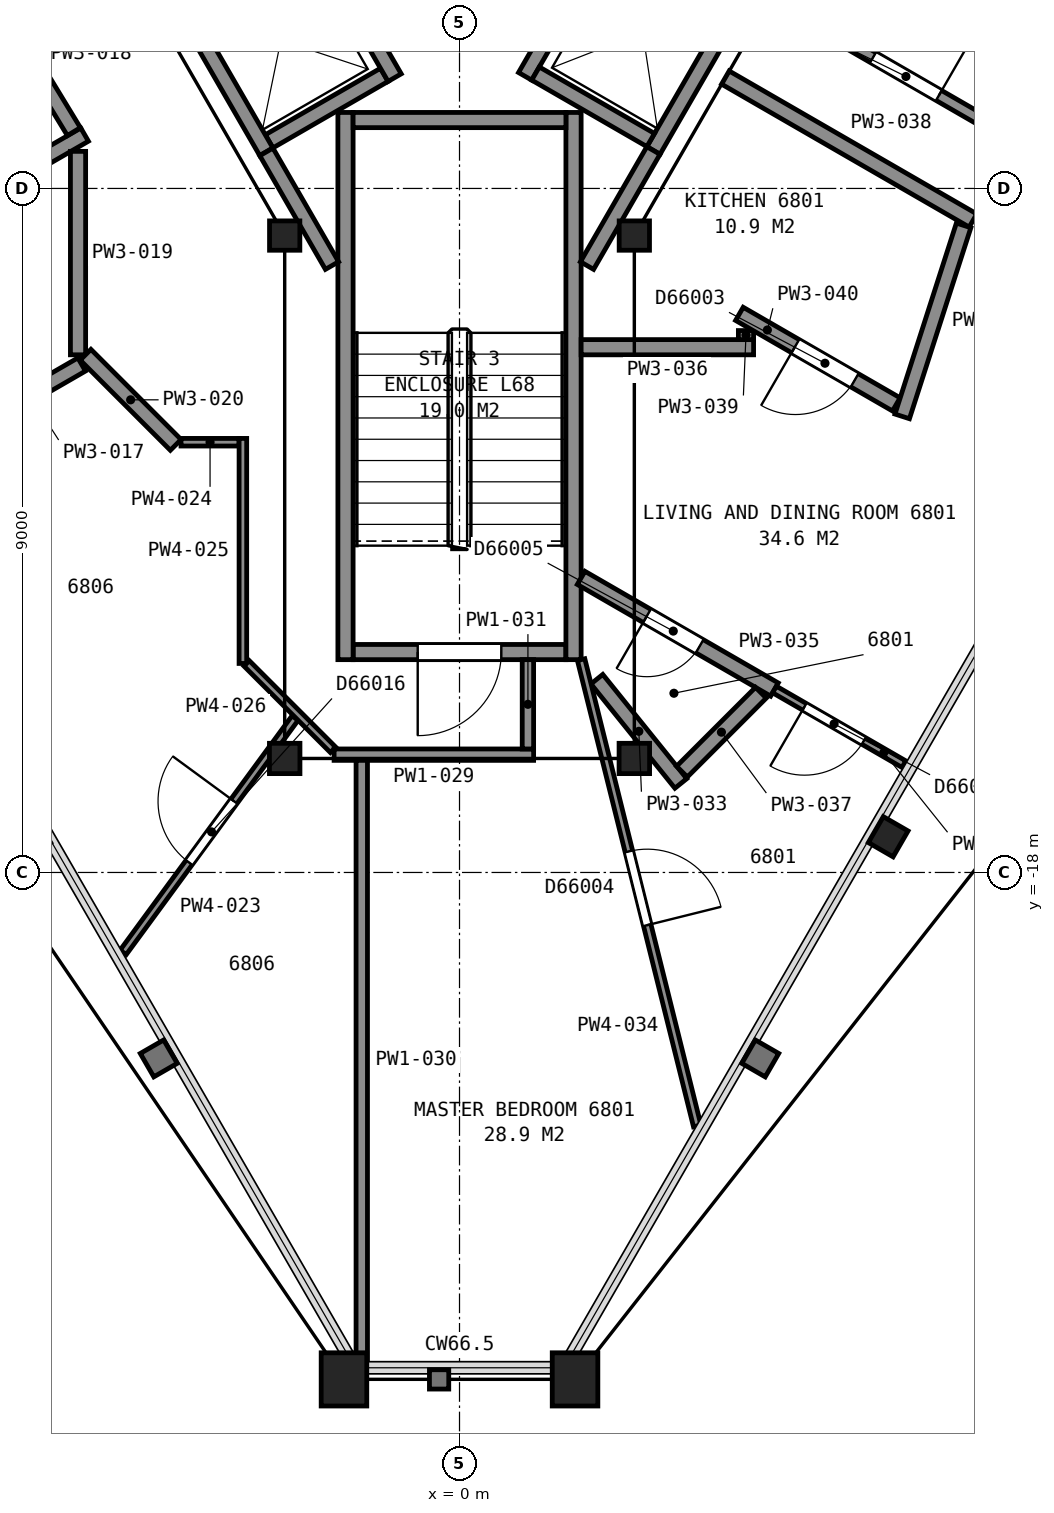
"""IFC4 building model, lengths in metres.
Left out: names, types, materials, properties, quantities, classifications, styles, units other than length and angle.
Written with IfcOpenShell. Run it as: python <this file> out.ifc"""

import sys

from ifc_helpers import new_model, si_unit, direction, frame, frame_2d, origin, origin_2d, place, context, subcontext, project, spatial, rectangle, hollow_rectangle, i_section, extrude, element, fill, save


model = new_model("IFC4")
c1 = context("Model", 3, precision=1e-05, world=origin(), true_north=direction((0.0, 1.0)))
c2 = subcontext(c1, "Body", "Model", "MODEL_VIEW")
j1 = project(units=[si_unit("LENGTHUNIT", "METRE"), si_unit("PLANEANGLEUNIT", "RADIAN")], contexts=[c1])
p1 = place(None, origin())
s1 = spatial("IfcSite", under=j1, at=p1, CompositionType="ELEMENT")
p2 = place(p1, origin())
s2 = spatial("IfcBuilding", under=s1, at=p2, CompositionType="ELEMENT")
p3 = place(p2, frame((0.0, 0.0, 271.4)))
s3 = spatial("IfcBuildingStorey", under=s2, at=p3, CompositionType="ELEMENT", Elevation=271.4)
for number, where, z_axis, x_axis in (
    (1, (-1.52, -24.67, 0.0), (0.0, 0.0, 1.0), (-1.0, 0.0, 0.0)),
    (2, (1.52, -24.67, 0.0), (0.0, 0.0, 1.0), (-1.0, 0.0, 0.0)),
):
    element("IfcColumn", number, at=place(p3, frame(where, z_axis=z_axis, x_axis=x_axis)), inside=s3, PredefinedType="COLUMN", context=c2, shape_type="SweptSolid", body=[
        extrude(hollow_rectangle(XDim=0.6, YDim=0.7, WallThickness=0.04, at=origin_2d()), origin(), (0.0, 0.0, 1.0), 3.7),
    ])
p4 = place(p3, frame((5.64, -17.53, 0.0), z_axis=(0.0, 0.0, 1.0), x_axis=(-0.5, -0.866025403784, 0.0)))
e3 = element("IfcColumn", 3, at=p4, inside=s3, PredefinedType="COLUMN", context=c2, shape_type="SweptSolid", body=[
    extrude(i_section(OverallWidth=0.394, OverallDepth=0.376, WebThickness=0.017, FlangeThickness=0.028, FilletRadius=0.015, at=origin_2d()), origin(), (0.0, 0.0, 1.0), 3.7),
])
p5 = place(p3, frame((-2.3, -9.62, 0.0), z_axis=(0.0, 0.0, 1.0), x_axis=(1.0, 0.0, 0.0)))
e4 = element("IfcColumn", 4, at=p5, inside=s3, PredefinedType="COLUMN", context=c2, shape_type="SweptSolid", body=[
    extrude(i_section(OverallWidth=0.399, OverallDepth=0.386, WebThickness=0.021, FlangeThickness=0.033, FilletRadius=0.015, at=origin_2d()), origin(), (0.0, 0.0, 1.0), 3.7),
])
for number, where, z_axis, x_axis in (
    (5, (-2.3, -16.5, 0.0), (0.0, 0.0, 1.0), (-1.0, 0.0, 0.0)),
    (6, (2.3, -16.5, 0.0), (0.0, 0.0, 1.0), (-1.0, 0.0, 0.0)),
):
    element("IfcColumn", number, at=place(p3, frame(where, z_axis=z_axis, x_axis=x_axis)), inside=s3, PredefinedType="COLUMN", context=c2, shape_type="SweptSolid", body=[
        extrude(i_section(OverallWidth=0.401, OverallDepth=0.399, WebThickness=0.025, FlangeThickness=0.04, FilletRadius=0.015, at=origin_2d()), origin(), (0.0, 0.0, 1.0), 3.7),
    ])
p6 = place(p3, frame((2.3, -9.62, 0.0), z_axis=(0.0, 0.0, 1.0), x_axis=(1.0, 0.0, 0.0)))
e7 = element("IfcColumn", 7, at=p6, inside=s3, PredefinedType="COLUMN", context=c2, shape_type="SweptSolid", body=[
    extrude(i_section(OverallWidth=0.399, OverallDepth=0.386, WebThickness=0.021, FlangeThickness=0.033, FilletRadius=0.015, at=origin_2d()), origin(), (0.0, 0.0, 1.0), 3.7),
])
p7 = place(p3, frame((-1.4, -15.1, 0.0), z_axis=(0.0, 0.0, 1.0), x_axis=(1.0, 0.0, 0.0)))
e8 = element("IfcWall", 8, at=p7, inside=s3, PredefinedType="PARTITIONING", context=c2, shape_type="SweptSolid", body=[
    extrude(rectangle(XDim=2.8, YDim=0.2, at=frame_2d((1.4, 0.0))), origin(), (0.0, 0.0, 1.0), 3.45),
])
p8 = place(p7, frame((0.85, 0.0, 0.0)))
e9 = element("IfcOpeningElement", 9, at=p8, cuts=e8, PredefinedType="OPENING", context=c2, shape_type="SweptSolid", body=[
    extrude(rectangle(XDim=1.1, YDim=2.1, at=frame_2d((0.55, 1.05))), frame((0.0, 0.11, 0.0), z_axis=(0.0, -1.0, 0.0), x_axis=(1.0, 0.0, 0.0)), (0.0, 0.0, 1.0), 0.22),
])
for number, where, z_axis, x_axis in (
    (10, (1.5, -8.0, 0.0), (0.0, 0.0, 1.0), (0.0, -1.0, 0.0)),
    (11, (-1.5, -8.0, 0.0), (0.0, 0.0, 1.0), (0.0, -1.0, 0.0)),
):
    element("IfcWall", number, at=place(p3, frame(where, z_axis=z_axis, x_axis=x_axis)), inside=s3, PredefinedType="PARTITIONING", context=c2, shape_type="SweptSolid", body=[
        extrude(rectangle(XDim=7.2, YDim=0.2, at=frame_2d((3.6, 0.0))), origin(), (0.0, 0.0, 1.0), 3.45),
    ])
p9 = place(p3, frame((-1.4, -8.1, 0.0), z_axis=(0.0, 0.0, 1.0), x_axis=(1.0, 0.0, 0.0)))
e12 = element("IfcWall", 12, at=p9, inside=s3, PredefinedType="PARTITIONING", context=c2, shape_type="SweptSolid", body=[
    extrude(rectangle(XDim=2.8, YDim=0.2, at=frame_2d((1.4, 0.0))), origin(), (0.0, 0.0, 1.0), 3.45),
])
p10 = place(p3, frame((-2.505, -8.38, 0.0), z_axis=(0.0, 0.0, 1.0), x_axis=(0.866002029911, 0.500040482552, 0.0)))
e13 = element("IfcWall", 13, at=p10, inside=s3, PredefinedType="PARTITIONING", context=c2, shape_type="SweptSolid", body=[
    extrude(rectangle(XDim=1.75, YDim=0.2, at=frame_2d((0.875, 0.0))), origin(), (0.0, 0.0, 1.0), 3.7),
])
p11 = place(p3, frame((2.552, -8.5, 0.0), z_axis=(0.0, 0.0, 1.0), x_axis=(0.499990435942, 0.866030925526, 0.0)))
e14 = element("IfcWall", 14, at=p11, inside=s3, PredefinedType="PARTITIONING", context=c2, shape_type="SweptSolid", body=[
    extrude(rectangle(XDim=2.55, YDim=0.2, at=frame_2d((1.275, 0.0))), origin(), (0.0, 0.0, 1.0), 3.7),
])
p12 = place(p3, frame((0.863, -7.525, 0.0), z_axis=(0.0, 0.0, 1.0), x_axis=(0.499990435942, 0.866030925526, 0.0)))
e15 = element("IfcWall", 15, at=p12, inside=s3, PredefinedType="PARTITIONING", context=c2, shape_type="SweptSolid", body=[
    extrude(rectangle(XDim=2.55, YDim=0.2, at=frame_2d((1.275, 0.0))), origin(), (0.0, 0.0, 1.0), 3.7),
])
p13 = place(p12, frame((0.725, 0.0, 0.0)))
e16 = element("IfcOpeningElement", 16, at=p13, cuts=e15, PredefinedType="OPENING", context=c2, shape_type="SweptSolid", body=[
    extrude(rectangle(XDim=1.1, YDim=2.1, at=frame_2d((0.55, 1.05))), frame((0.0, 0.11, 0.0), z_axis=(0.0, -1.0, 0.0), x_axis=(1.0, 0.0, 0.0)), (0.0, 0.0, 1.0), 0.22),
])
p14 = place(p3, frame((-0.853, -7.542, 0.0), z_axis=(0.0, 0.0, 1.0), x_axis=(-0.500016218704, 0.866016039709, 0.0)))
e17 = element("IfcWall", 17, at=p14, inside=s3, PredefinedType="PARTITIONING", context=c2, shape_type="SweptSolid", body=[
    extrude(rectangle(XDim=2.35, YDim=0.2, at=frame_2d((1.175, 0.0))), origin(), (0.0, 0.0, 1.0), 3.7),
])
p15 = place(p14, frame((0.625, 0.0, 0.0)))
e18 = element("IfcOpeningElement", 18, at=p15, cuts=e17, PredefinedType="OPENING", context=c2, shape_type="SweptSolid", body=[
    extrude(rectangle(XDim=1.1, YDim=2.1, at=frame_2d((0.55, 1.05))), frame((0.0, 0.11, 0.0), z_axis=(0.0, -1.0, 0.0), x_axis=(1.0, 0.0, 0.0)), (0.0, 0.0, 1.0), 0.22),
])
p16 = place(p3, frame((-2.542, -8.517, 0.0), z_axis=(0.0, 0.0, 1.0), x_axis=(-0.500016218704, 0.866016039709, 0.0)))
e19 = element("IfcWall", 19, at=p16, inside=s3, PredefinedType="PARTITIONING", context=c2, shape_type="SweptSolid", body=[
    extrude(rectangle(XDim=2.35, YDim=0.2, at=frame_2d((1.175, 0.0))), origin(), (0.0, 0.0, 1.0), 3.7),
])
p17 = place(p3, frame((2.515, -8.363, 0.0), z_axis=(0.0, 0.0, 1.0), x_axis=(-0.866036909293, 0.499980071345, 0.0)))
e20 = element("IfcWall", 20, at=p17, inside=s3, PredefinedType="PARTITIONING", context=c2, shape_type="SweptSolid", body=[
    extrude(rectangle(XDim=1.75, YDim=0.2, at=frame_2d((0.875, 0.0))), origin(), (0.0, 0.0, 1.0), 3.7),
])
p18 = place(p3, frame((-2.541, -8.519, 0.0), z_axis=(0.0, 0.0, 1.0), x_axis=(0.500016142392, -0.86601608377, 0.0)))
e21 = element("IfcWall", 21, at=p18, inside=s3, PredefinedType="PARTITIONING", context=c2, shape_type="SweptSolid", body=[
    extrude(rectangle(XDim=1.727, YDim=0.2, at=frame_2d((0.864, 0.0))), origin(), (0.0, 0.0, 1.0), 3.45),
])
p19 = place(p3, frame((1.677, -10.015, 0.0), z_axis=(0.0, 0.0, 1.0), x_axis=(0.49983532306, 0.866120459187, 0.0)))
e22 = element("IfcWall", 22, at=p19, inside=s3, PredefinedType="PARTITIONING", context=c2, shape_type="SweptSolid", body=[
    extrude(rectangle(XDim=1.748, YDim=0.2, at=frame_2d((0.874, 0.0))), origin(), (0.0, 0.0, 1.0), 3.45),
])
p20 = place(p3, frame((-7.606, -9.835, 0.0), z_axis=(0.0, 0.0, 1.0), x_axis=(0.866093395895, 0.499882215713, 0.0)))
e23 = element("IfcWall", 23, at=p20, inside=s3, PredefinedType="PARTITIONING", context=c2, shape_type="SweptSolid", body=[
    extrude(rectangle(XDim=3.087, YDim=0.2, at=frame_2d((1.543, 0.0))), origin(), (0.0, 0.0, 1.0), 2.723),
])
p21 = place(p3, frame((-6.348, -12.111, 0.0), z_axis=(0.0, 0.0, 1.0), x_axis=(0.866004001318, 0.500037068326, 0.0)))
e24 = element("IfcWall", 24, at=p21, inside=s3, PredefinedType="PARTITIONING", context=c2, shape_type="SweptSolid", body=[
    extrude(rectangle(XDim=1.59, YDim=0.2, at=frame_2d((0.795, 0.0))), origin(), (0.0, 0.0, 1.0), 2.723),
])
p22 = place(p3, frame((-6.316, -6.209, 0.0), z_axis=(0.0, 0.0, 1.0), x_axis=(0.519665190876, -0.854369995606, 0.0)))
e25 = element("IfcWall", 25, at=p22, inside=s3, PredefinedType="PARTITIONING", context=c2, shape_type="SweptSolid", body=[
    extrude(rectangle(XDim=2.392, YDim=0.2, at=frame_2d((1.196, 0.0))), origin(), (0.0, 0.0, 1.0), 2.723),
])
p23 = place(p3, frame((-5.019, -11.189, 0.0), z_axis=(0.0, 0.0, 1.0), x_axis=(0.0, 1.0, 0.0)))
e26 = element("IfcWall", 26, at=p23, inside=s3, PredefinedType="PARTITIONING", context=c2, shape_type="SweptSolid", body=[
    extrude(rectangle(XDim=2.677, YDim=0.2, at=frame_2d((1.338, 0.0))), origin(), (0.0, 0.0, 1.0), 2.723),
])
p24 = place(p3, frame((-4.92, -11.188, 0.0), z_axis=(0.0, 0.0, 1.0), x_axis=(0.707106781187, -0.707106781187, 0.0)))
e27 = element("IfcWall", 27, at=p24, inside=s3, PredefinedType="PARTITIONING", context=c2, shape_type="SweptSolid", body=[
    extrude(rectangle(XDim=1.678, YDim=0.2, at=frame_2d((0.839, 0.0))), origin(), (0.0, 0.0, 1.0), 2.723),
])
p25 = place(p3, frame((-2.164, -15.968, 0.0), z_axis=(0.0, 0.0, 1.0), x_axis=(-0.591435630084, -0.806352215516, 0.0)))
e28 = element("IfcWall", 28, at=p25, inside=s3, PredefinedType="PARTITIONING", context=c2, shape_type="SweptSolid", body=[
    extrude(rectangle(XDim=3.824, YDim=0.1, at=frame_2d((1.912, 0.0))), origin(), (0.0, 0.0, 1.0), 2.723),
])
p26 = place(p25, frame((1.358, 0.0, 0.0)))
e29 = element("IfcOpeningElement", 29, at=p26, cuts=e28, PredefinedType="OPENING", context=c2, shape_type="SweptSolid", body=[
    extrude(rectangle(XDim=1.0, YDim=2.1, at=frame_2d((0.5, 1.05))), frame((0.0, 0.06, 0.0), z_axis=(0.0, -1.0, 0.0), x_axis=(1.0, 0.0, 0.0)), (0.0, 0.0, 1.0), 0.12),
])
p27 = place(p3, frame((-3.664, -12.339, 0.0), z_axis=(0.0, 0.0, 1.0), x_axis=(1.0, 0.0, 0.0)))
e30 = element("IfcWall", 30, at=p27, inside=s3, PredefinedType="PARTITIONING", context=c2, shape_type="SweptSolid", body=[
    extrude(rectangle(XDim=0.764, YDim=0.1, at=frame_2d((0.382, 0.0))), origin(), (0.0, 0.0, 1.0), 2.723),
])
p28 = place(p3, frame((-2.85, -15.25, 0.0), z_axis=(0.0, 0.0, 1.0), x_axis=(0.0, 1.0, 0.0)))
e31 = element("IfcWall", 31, at=p28, inside=s3, PredefinedType="PARTITIONING", context=c2, shape_type="SweptSolid", body=[
    extrude(rectangle(XDim=2.961, YDim=0.1, at=frame_2d((1.48, 0.0))), origin(), (0.0, 0.0, 1.0), 2.723),
])
p29 = place(p3, frame((-2.801, -15.25, 0.0), z_axis=(0.0, 0.0, 1.0), x_axis=(0.707106781187, -0.707106781187, 0.0)))
e32 = element("IfcWall", 32, at=p29, inside=s3, PredefinedType="PARTITIONING", context=c2, shape_type="SweptSolid", body=[
    extrude(rectangle(XDim=1.608, YDim=0.1, at=frame_2d((0.804, 0.0))), origin(), (0.0, 0.0, 1.0), 2.723),
])
p30 = place(p3, frame((-1.65, -16.45, 0.0), z_axis=(0.0, 0.0, 1.0), x_axis=(1.0, 0.0, 0.0)))
e33 = element("IfcWall", 33, at=p30, inside=s3, PredefinedType="PARTITIONING", context=c2, shape_type="SweptSolid", body=[
    extrude(rectangle(XDim=2.625, YDim=0.15, at=frame_2d((1.312, 0.0))), origin(), (0.0, 0.0, 1.0), 2.723),
])
p31 = place(p3, frame((-1.286, -24.421, 0.0), z_axis=(0.0, 0.0, 1.0), x_axis=(0.0, 1.0, 0.0)))
e34 = element("IfcWall", 34, at=p31, inside=s3, PredefinedType="PARTITIONING", context=c2, shape_type="SweptSolid", body=[
    extrude(rectangle(XDim=7.896, YDim=0.15, at=frame_2d((3.948, 0.0))), origin(), (0.0, 0.0, 1.0), 2.723),
])
p32 = place(p3, frame((0.9, -16.375, 0.0), z_axis=(0.0, 0.0, 1.0), x_axis=(0.0, 1.0, 0.0)))
e35 = element("IfcWall", 35, at=p32, inside=s3, PredefinedType="PARTITIONING", context=c2, shape_type="SweptSolid", body=[
    extrude(rectangle(XDim=1.175, YDim=0.15, at=frame_2d((0.587, 0.0))), origin(), (0.0, 0.0, 1.0), 2.723),
])
p33 = place(p3, frame((1.807, -15.457, 0.0), z_axis=(0.0, 0.0, 1.0), x_axis=(0.62721044395, -0.778849830841, 0.0)))
e36 = element("IfcWall", 36, at=p33, inside=s3, PredefinedType="PARTITIONING", context=c2, shape_type="SweptSolid", body=[
    extrude(rectangle(XDim=1.761, YDim=0.2, at=frame_2d((0.881, 0.0))), origin(), (0.0, 0.0, 1.0), 2.723),
])
p34 = place(p3, frame((3.127, -21.335, 0.0), z_axis=(0.0, 0.0, 1.0), x_axis=(-0.241554155251, 0.970387340231, 0.0)))
e37 = element("IfcWall", 37, at=p34, inside=s3, PredefinedType="PARTITIONING", context=c2, shape_type="SweptSolid", body=[
    extrude(rectangle(XDim=6.322, YDim=0.1, at=frame_2d((3.161, 0.0))), origin(), (0.0, 0.0, 1.0), 2.723),
])
p35 = place(p34, frame((2.722, 0.0, 0.0)))
e38 = element("IfcOpeningElement", 38, at=p35, cuts=e37, PredefinedType="OPENING", context=c2, shape_type="SweptSolid", body=[
    extrude(rectangle(XDim=1.0, YDim=2.1, at=frame_2d((0.5, 1.05))), frame((0.0, 0.06, 0.0), z_axis=(0.0, -1.0, 0.0), x_axis=(1.0, 0.0, 0.0)), (0.0, 0.0, 1.0), 0.12),
])
p36 = place(p3, frame((4.144, -15.593, 0.0), z_axis=(0.0, 0.0, 1.0), x_axis=(-0.865947474014, 0.500134954036, 0.0)))
e39 = element("IfcWall", 39, at=p36, inside=s3, PredefinedType="PARTITIONING", context=c2, shape_type="SweptSolid", body=[
    extrude(rectangle(XDim=2.937, YDim=0.2, at=frame_2d((1.469, 0.0))), origin(), (0.0, 0.0, 1.0), 2.723),
])
p37 = place(p36, frame((1.137, 0.0, 0.0)))
e40 = element("IfcOpeningElement", 40, at=p37, cuts=e39, PredefinedType="OPENING", context=c2, shape_type="SweptSolid", body=[
    extrude(rectangle(XDim=0.8, YDim=2.1, at=frame_2d((0.4, 1.05))), frame((0.0, 0.11, 0.0), z_axis=(0.0, -1.0, 0.0), x_axis=(1.0, 0.0, 0.0)), (0.0, 0.0, 1.0), 0.22),
])
p38 = place(p3, frame((1.6, -11.089, 0.0), z_axis=(0.0, 0.0, 1.0), x_axis=(1.0, 0.0, 0.0)))
e41 = element("IfcWall", 41, at=p38, inside=s3, PredefinedType="PARTITIONING", context=c2, shape_type="SweptSolid", body=[
    extrude(rectangle(XDim=2.269, YDim=0.2, at=frame_2d((1.134, 0.0))), origin(), (0.0, 0.0, 1.0), 2.723),
])
p39 = place(p3, frame((2.927, -16.673, 0.0), z_axis=(0.0, 0.0, 1.0), x_axis=(0.707106781187, 0.707106781187, 0.0)))
e42 = element("IfcWall", 42, at=p39, inside=s3, PredefinedType="PARTITIONING", context=c2, shape_type="SweptSolid", body=[
    extrude(rectangle(XDim=1.469, YDim=0.2, at=frame_2d((0.734, 0.0))), origin(), (0.0, 0.0, 1.0), 2.723),
])
p40 = place(p3, frame((3.498, -7.541, 0.0), z_axis=(0.0, 0.0, 1.0), x_axis=(0.865985624761, -0.500068892961, 0.0)))
e43 = element("IfcWall", 43, at=p40, inside=s3, PredefinedType="PARTITIONING", context=c2, shape_type="SweptSolid", body=[
    extrude(rectangle(XDim=3.762, YDim=0.2, at=frame_2d((1.881, 0.0))), origin(), (0.0, 0.0, 1.0), 2.723),
])
p41 = place(p3, frame((3.769, -10.989, 0.0), z_axis=(0.0, 0.0, 1.0), x_axis=(0.0, 1.0, 0.0)))
e44 = element("IfcWall", 44, at=p41, inside=s3, PredefinedType="PARTITIONING", context=c2, shape_type="SweptSolid", body=[
    extrude(rectangle(XDim=0.119, YDim=0.2, at=frame_2d((0.06, 0.0))), origin(), (0.0, 0.0, 1.0), 2.723),
])
p42 = place(p3, frame((3.682, -10.65, 0.0), z_axis=(0.0, 0.0, 1.0), x_axis=(0.86607302589, -0.499917507021, 0.0)))
e45 = element("IfcWall", 45, at=p42, inside=s3, PredefinedType="PARTITIONING", context=c2, shape_type="SweptSolid", body=[
    extrude(rectangle(XDim=2.384, YDim=0.2, at=frame_2d((1.192, 0.0))), origin(), (0.0, 0.0, 1.0), 2.723),
])
p43 = place(p42, frame((0.85, 0.0, 0.0)))
e46 = element("IfcOpeningElement", 46, at=p43, cuts=e45, PredefinedType="OPENING", context=c2, shape_type="SweptSolid", body=[
    extrude(rectangle(XDim=0.9, YDim=2.1, at=frame_2d((0.45, 1.05))), frame((0.0, 0.11, 0.0), z_axis=(0.0, -1.0, 0.0), x_axis=(1.0, 0.0, 0.0)), (0.0, 0.0, 1.0), 0.22),
])
p44 = place(p3, frame((5.847, -16.575, 0.0), z_axis=(0.0, 0.0, 1.0), x_axis=(-0.866156637233, 0.499772628079, 0.0)))
e47 = element("IfcWall", 47, at=p44, inside=s3, PredefinedType="PARTITIONING", context=c2, shape_type="SweptSolid", body=[
    extrude(rectangle(XDim=1.966, YDim=0.1, at=frame_2d((0.983, 0.0))), origin(), (0.0, 0.0, 1.0), 2.723),
])
p45 = place(p44, frame((0.611, 0.0, 0.0)))
e48 = element("IfcOpeningElement", 48, at=p45, cuts=e47, PredefinedType="OPENING", context=c2, shape_type="SweptSolid", body=[
    extrude(rectangle(XDim=0.9, YDim=2.1, at=frame_2d((0.45, 1.05))), frame((0.0, 0.06, 0.0), z_axis=(0.0, -1.0, 0.0), x_axis=(1.0, 0.0, 0.0)), (0.0, 0.0, 1.0), 0.12),
])
p46 = place(p3, frame((9.772, -9.777, 0.0), z_axis=(0.0, 0.0, 1.0), x_axis=(-0.866083818164, 0.499898809675, 0.0)))
e49 = element("IfcWall", 49, at=p46, inside=s3, PredefinedType="PARTITIONING", context=c2, shape_type="SweptSolid", body=[
    extrude(rectangle(XDim=6.551, YDim=0.15, at=frame_2d((3.275, 0.0))), origin(), (0.0, 0.0, 1.0), 2.723),
])
p47 = place(p46, frame((4.001, 0.0, 0.0)))
e50 = element("IfcOpeningElement", 50, at=p47, cuts=e49, PredefinedType="OPENING", context=c2, shape_type="SweptSolid", body=[
    extrude(rectangle(XDim=1.0, YDim=2.1, at=frame_2d((0.5, 1.05))), frame((0.0, 0.085, 0.0), z_axis=(0.0, -1.0, 0.0), x_axis=(1.0, 0.0, 0.0)), (0.0, 0.0, 1.0), 0.17),
])
p48 = place(p3, frame((5.824, -11.999, 0.0), z_axis=(0.0, 0.0, 1.0), x_axis=(0.306054089199, 0.95201412515, 0.0)))
e51 = element("IfcWall", 51, at=p48, inside=s3, PredefinedType="PARTITIONING", context=c2, shape_type="SweptSolid", body=[
    extrude(rectangle(XDim=2.64, YDim=0.2, at=frame_2d((1.32, 0.0))), origin(), (0.0, 0.0, 1.0), 2.723),
])
p49 = place(p8, origin())
e52 = element("IfcDoor", 52, at=p49, inside=s3, OperationType="SINGLE_SWING_LEFT", PredefinedType="DOOR", context=c2, shape_type="SweptSolid", body=[
    extrude(rectangle(XDim=1.1, YDim=2.1, at=frame_2d((0.55, 1.05))), frame((0.0, 0.025, 0.0), z_axis=(0.0, -1.0, 0.0), x_axis=(1.0, 0.0, 0.0)), (0.0, 0.0, 1.0), 0.05),
])
fill(e9, e52)
p50 = place(p26, origin())
e53 = element("IfcDoor", 53, at=p50, inside=s3, OperationType="SINGLE_SWING_LEFT", PredefinedType="DOOR", context=c2, shape_type="SweptSolid", body=[
    extrude(rectangle(XDim=1.0, YDim=2.1, at=frame_2d((0.5, 1.05))), frame((0.0, 0.025, 0.0), z_axis=(0.0, -1.0, 0.0), x_axis=(1.0, 0.0, 0.0)), (0.0, 0.0, 1.0), 0.05),
])
fill(e29, e53)
p51 = place(p35, origin())
e54 = element("IfcDoor", 54, at=p51, inside=s3, OperationType="SINGLE_SWING_LEFT", PredefinedType="DOOR", context=c2, shape_type="SweptSolid", body=[
    extrude(rectangle(XDim=1.0, YDim=2.1, at=frame_2d((0.5, 1.05))), frame((0.0, 0.025, 0.0), z_axis=(0.0, -1.0, 0.0), x_axis=(1.0, 0.0, 0.0)), (0.0, 0.0, 1.0), 0.05),
])
fill(e38, e54)
p52 = place(p37, origin())
e55 = element("IfcDoor", 55, at=p52, inside=s3, OperationType="SINGLE_SWING_RIGHT", PredefinedType="DOOR", context=c2, shape_type="SweptSolid", body=[
    extrude(rectangle(XDim=0.8, YDim=2.1, at=frame_2d((0.4, 1.05))), frame((0.0, 0.025, 0.0), z_axis=(0.0, -1.0, 0.0), x_axis=(1.0, 0.0, 0.0)), (0.0, 0.0, 1.0), 0.05),
])
fill(e40, e55)
p53 = place(p43, origin())
e56 = element("IfcDoor", 56, at=p53, inside=s3, OperationType="SINGLE_SWING_LEFT", PredefinedType="DOOR", context=c2, shape_type="SweptSolid", body=[
    extrude(rectangle(XDim=0.9, YDim=2.1, at=frame_2d((0.45, 1.05))), frame((0.0, 0.025, 0.0), z_axis=(0.0, -1.0, 0.0), x_axis=(1.0, 0.0, 0.0)), (0.0, 0.0, 1.0), 0.05),
])
fill(e46, e56)
p54 = place(p45, origin())
e57 = element("IfcDoor", 57, at=p54, inside=s3, OperationType="SINGLE_SWING_RIGHT", PredefinedType="DOOR", context=c2, shape_type="SweptSolid", body=[
    extrude(rectangle(XDim=0.9, YDim=2.1, at=frame_2d((0.45, 1.05))), frame((0.0, 0.025, 0.0), z_axis=(0.0, -1.0, 0.0), x_axis=(1.0, 0.0, 0.0)), (0.0, 0.0, 1.0), 0.05),
])
fill(e48, e57)
p55 = place(p47, origin())
e58 = element("IfcDoor", 58, at=p55, inside=s3, OperationType="SINGLE_SWING_LEFT", PredefinedType="DOOR", context=c2, shape_type="SweptSolid", body=[
    extrude(rectangle(XDim=1.0, YDim=2.1, at=frame_2d((0.5, 1.05))), frame((0.0, 0.025, 0.0), z_axis=(0.0, -1.0, 0.0), x_axis=(1.0, 0.0, 0.0)), (0.0, 0.0, 1.0), 0.05),
])
fill(e50, e58)
save(model, sys.argv[1])
